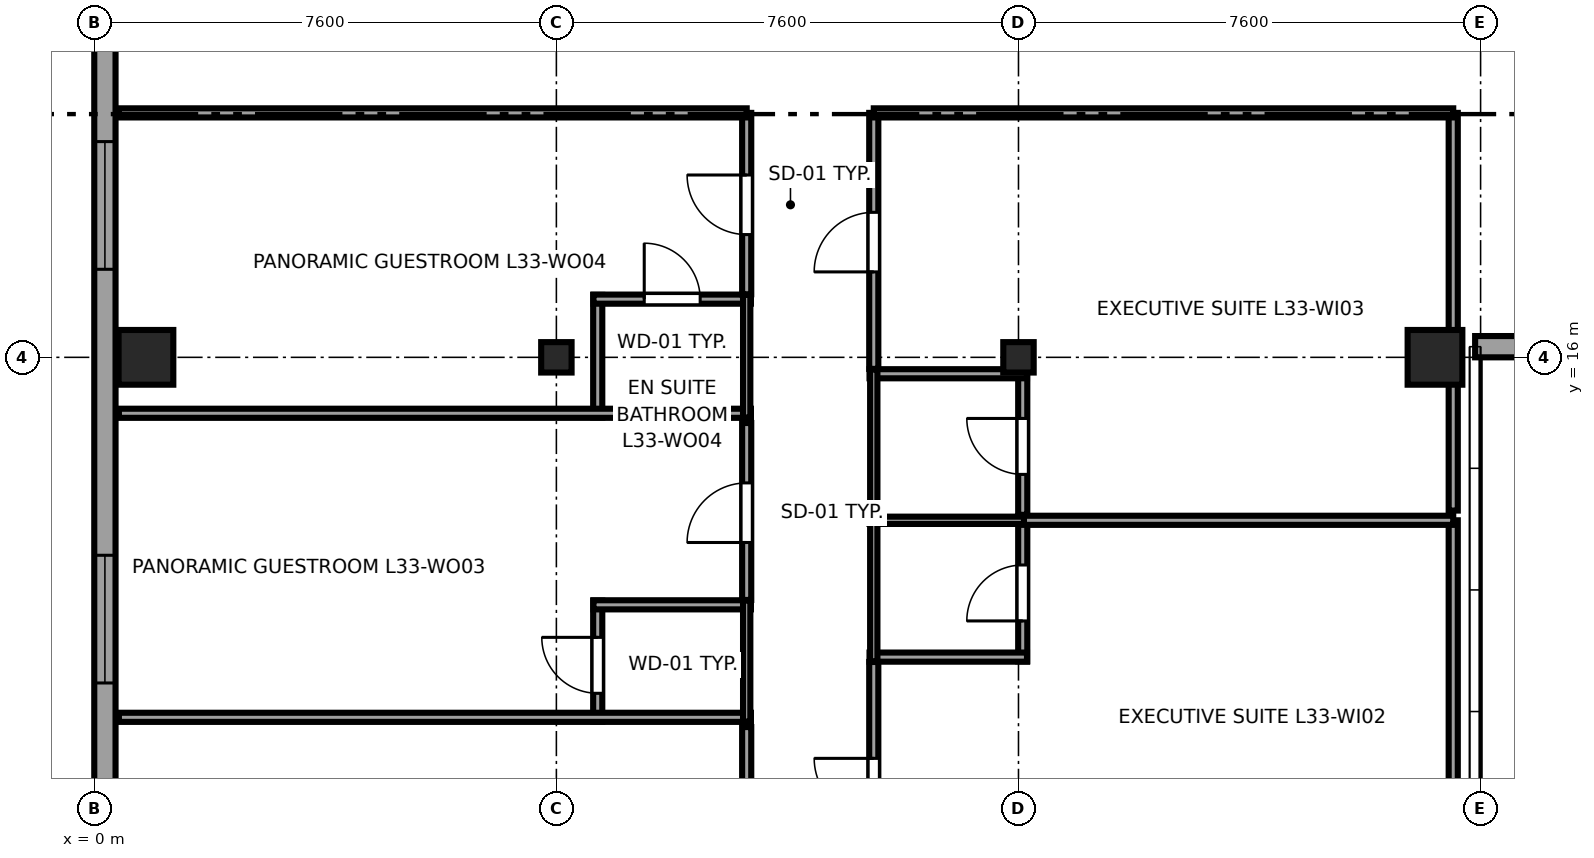
"""IFC4 building model, lengths in metres.
Left out: names, types, materials, properties, quantities, classifications, styles, units other than length and angle.
Written with IfcOpenShell. Run it as: python <this file> out.ifc"""

import sys

from ifc_helpers import new_model, si_unit, direction, frame, frame_2d, origin, origin_2d, place, context, subcontext, project, spatial, rectangle, i_section, extrude, source, transform, mapped, element, fill, save


model = new_model("IFC4")
c1 = context("Model", 3, precision=1e-05, world=origin(), true_north=direction((0.0, 1.0)))
c2 = subcontext(c1, "Body", "Model", "MODEL_VIEW")
j1 = project(units=[si_unit("LENGTHUNIT", "METRE"), si_unit("PLANEANGLEUNIT", "RADIAN")], contexts=[c1])
p1 = place(None, origin())
s1 = spatial("IfcSite", under=j1, at=p1, CompositionType="ELEMENT")
p2 = place(p1, origin())
s2 = spatial("IfcBuilding", under=s1, at=p2, CompositionType="ELEMENT")
p3 = place(p2, frame((0.0, 0.0, 129.3)))
s3 = spatial("IfcBuildingStorey", under=s2, at=p3, CompositionType="ELEMENT", Elevation=129.3)
m1 = source(origin(), c2, "Body", "SweptSolid", [
    extrude(rectangle(XDim=0.9, YDim=0.9, at=origin_2d()), origin(), (0.0, 0.0, 1.0), 3.55),
])
p4 = place(p3, frame((0.85, 16.0, 0.0), z_axis=(0.0, 0.0, 1.0), x_axis=(1.0, 0.0, 0.0)))
e1 = element("IfcColumn", 1, at=p4, inside=s3, PredefinedType="COLUMN", context=c2, shape_type="MappedRepresentation", body=[
    mapped(m1, transform((0.0, 0.0, 0.0), x_axis=(1.0, 0.0, 0.0), y_axis=(0.0, 1.0, 0.0), z_axis=(0.0, 0.0, 1.0), scale=1.0)),
])
m2 = source(origin(), c2, "Body", "SweptSolid", [
    extrude(i_section(OverallWidth=0.5, OverallDepth=0.5, WebThickness=0.022, FlangeThickness=0.034, at=origin_2d()), origin(), (0.0, 0.0, 1.0), 3.55),
])
for number, where, z_axis, x_axis in (
    (2, (7.6, 16.0, 0.0), (0.0, 0.0, 1.0), (1.0, 0.0, 0.0)),
    (3, (15.2, 16.0, 0.0), (0.0, 0.0, 1.0), (1.0, 0.0, 0.0)),
):
    element("IfcColumn", number, at=place(p3, frame(where, z_axis=z_axis, x_axis=x_axis)), inside=s3, PredefinedType="COLUMN", context=c2, shape_type="MappedRepresentation", body=[
        mapped(m2, transform((0.0, 0.0, 0.0), x_axis=(1.0, 0.0, 0.0), y_axis=(0.0, 1.0, 0.0), z_axis=(0.0, 0.0, 1.0), scale=1.0)),
    ])
p5 = place(p3, frame((22.05, 16.0, 0.0), z_axis=(0.0, 0.0, 1.0), x_axis=(1.0, 0.0, 0.0)))
e4 = element("IfcColumn", 4, at=p5, inside=s3, PredefinedType="COLUMN", context=c2, shape_type="MappedRepresentation", body=[
    mapped(m1, transform((0.0, 0.0, 0.0), x_axis=(1.0, 0.0, 0.0), y_axis=(0.0, 1.0, 0.0), z_axis=(0.0, 0.0, 1.0), scale=1.0)),
])
p6 = place(p3, frame((22.71, 16.175, 0.0), z_axis=(0.0, 0.0, 1.0), x_axis=(1.0, 0.0, 0.0)))
e5 = element("IfcWall", 5, at=p6, inside=s3, PredefinedType="SOLIDWALL", context=c2, shape_type="SweptSolid", body=[
    extrude(rectangle(XDim=11.58, YDim=0.35, at=frame_2d((5.79, 0.0))), origin(), (0.0, 0.0, 1.0), 2.748),
])
p7 = place(p6, frame((2.145, 0.0, 0.68)))
e6 = element("IfcOpeningElement", 6, at=p7, cuts=e5, PredefinedType="OPENING", context=c2, shape_type="SweptSolid", body=[
    extrude(rectangle(XDim=2.1, YDim=1.9, at=frame_2d((1.05, 0.95))), frame((0.0, 0.185, 0.0), z_axis=(0.0, -1.0, 0.0), x_axis=(1.0, 0.0, 0.0)), (0.0, 0.0, 1.0), 0.37),
])
p8 = place(p6, frame((7.335, 0.0, 0.68)))
e7 = element("IfcOpeningElement", 7, at=p8, cuts=e5, PredefinedType="OPENING", context=c2, shape_type="SweptSolid", body=[
    extrude(rectangle(XDim=2.1, YDim=1.9, at=frame_2d((1.05, 0.95))), frame((0.0, 0.185, 0.0), z_axis=(0.0, -1.0, 0.0), x_axis=(1.0, 0.0, 0.0)), (0.0, 0.0, 1.0), 0.37),
])
p9 = place(p3, frame((0.175, 41.383, 0.0), z_axis=(0.0, 0.0, 1.0), x_axis=(0.0, -1.0, 0.0)))
e8 = element("IfcWall", 8, at=p9, inside=s3, PredefinedType="SOLIDWALL", context=c2, shape_type="SweptSolid", body=[
    extrude(rectangle(XDim=36.766, YDim=0.35, at=frame_2d((18.383, 0.0))), origin(), (0.0, 0.0, 1.0), 3.37),
])
p10 = place(p9, frame((9.429, 0.0, 0.68)))
e9 = element("IfcOpeningElement", 9, at=p10, cuts=e8, PredefinedType="OPENING", context=c2, shape_type="SweptSolid", body=[
    extrude(rectangle(XDim=2.1, YDim=1.9, at=frame_2d((1.05, 0.95))), frame((0.0, 0.185, 0.0), z_axis=(0.0, -1.0, 0.0), x_axis=(1.0, 0.0, 0.0)), (0.0, 0.0, 1.0), 0.37),
])
p11 = place(p9, frame((13.381, 0.0, 0.68)))
e10 = element("IfcOpeningElement", 10, at=p11, cuts=e8, PredefinedType="OPENING", context=c2, shape_type="SweptSolid", body=[
    extrude(rectangle(XDim=2.1, YDim=1.9, at=frame_2d((1.05, 0.95))), frame((0.0, 0.185, 0.0), z_axis=(0.0, -1.0, 0.0), x_axis=(1.0, 0.0, 0.0)), (0.0, 0.0, 1.0), 0.37),
])
p12 = place(p9, frame((21.835, 0.0, 0.68)))
e11 = element("IfcOpeningElement", 11, at=p12, cuts=e8, PredefinedType="OPENING", context=c2, shape_type="SweptSolid", body=[
    extrude(rectangle(XDim=2.1, YDim=1.9, at=frame_2d((1.05, 0.95))), frame((0.0, 0.185, 0.0), z_axis=(0.0, -1.0, 0.0), x_axis=(1.0, 0.0, 0.0)), (0.0, 0.0, 1.0), 0.37),
])
p13 = place(p9, frame((28.638, 0.0, 0.68)))
e12 = element("IfcOpeningElement", 12, at=p13, cuts=e8, PredefinedType="OPENING", context=c2, shape_type="SweptSolid", body=[
    extrude(rectangle(XDim=2.1, YDim=1.9, at=frame_2d((1.05, 0.95))), frame((0.0, 0.185, 0.0), z_axis=(0.0, -1.0, 0.0), x_axis=(1.0, 0.0, 0.0)), (0.0, 0.0, 1.0), 0.37),
])
p14 = place(p9, frame((33.183, 0.0, 0.62)))
e13 = element("IfcOpeningElement", 13, at=p14, cuts=e8, PredefinedType="OPENING", context=c2, shape_type="SweptSolid", body=[
    extrude(rectangle(XDim=1.5, YDim=1.55, at=frame_2d((0.75, 0.775))), frame((0.0, 0.185, 0.0), z_axis=(0.0, -1.0, 0.0), x_axis=(1.0, 0.0, 0.0)), (0.0, 0.0, 1.0), 0.37),
])
p15 = place(p9, frame((0.861, 0.0, 0.62)))
e14 = element("IfcOpeningElement", 14, at=p15, cuts=e8, PredefinedType="OPENING", context=c2, shape_type="SweptSolid", body=[
    extrude(rectangle(XDim=1.5, YDim=1.55, at=frame_2d((0.75, 0.775))), frame((0.0, 0.185, 0.0), z_axis=(0.0, -1.0, 0.0), x_axis=(1.0, 0.0, 0.0)), (0.0, 0.0, 1.0), 0.37),
])
p16 = place(p3, frame((8.28, 10.01, 0.0), z_axis=(0.0, 0.0, 1.0), x_axis=(0.0, 1.0, 0.0)))
e15 = element("IfcWall", 15, at=p16, inside=s3, PredefinedType="PARTITIONING", context=c2, shape_type="SweptSolid", body=[
    extrude(rectangle(XDim=1.99, YDim=0.15, at=frame_2d((0.995, 0.0))), origin(), (0.0, 0.0, 1.0), 3.37),
])
p17 = place(p16, frame((0.465, 0.0, 0.0)))
e16 = element("IfcOpeningElement", 16, at=p17, cuts=e15, PredefinedType="OPENING", context=c2, shape_type="SweptSolid", body=[
    extrude(rectangle(XDim=0.92, YDim=2.01, at=frame_2d((0.46, 1.005))), frame((0.0, 0.085, 0.0), z_axis=(0.0, -1.0, 0.0), x_axis=(1.0, 0.0, 0.0)), (0.0, 0.0, 1.0), 0.17),
])
p18 = place(p3, frame((0.405, 10.08, 0.0), z_axis=(0.0, 0.0, 1.0), x_axis=(1.0, 0.0, 0.0)))
e17 = element("IfcWall", 17, at=p18, inside=s3, PredefinedType="PARTITIONING", context=c2, shape_type="SweptSolid", body=[
    extrude(rectangle(XDim=10.395, YDim=0.15, at=frame_2d((5.198, 0.0))), origin(), (0.0, 0.0, 1.0), 3.37),
])
p19 = place(p3, frame((8.21, 11.93, 0.0), z_axis=(0.0, 0.0, 1.0), x_axis=(1.0, 0.0, 0.0)))
e18 = element("IfcWall", 18, at=p19, inside=s3, PredefinedType="PARTITIONING", context=c2, shape_type="SweptSolid", body=[
    extrude(rectangle(XDim=2.59, YDim=0.15, at=frame_2d((1.295, 0.0))), origin(), (0.0, 0.0, 1.0), 3.37),
])
p20 = place(p3, frame((10.73, 10.01, 0.0), z_axis=(0.0, 0.0, 1.0), x_axis=(0.0, 1.0, 0.0)))
e19 = element("IfcWall", 19, at=p20, inside=s3, PredefinedType="PLUMBINGWALL", context=c2, shape_type="SweptSolid", body=[
    extrude(rectangle(XDim=1.99, YDim=0.12, at=frame_2d((0.995, 0.0))), origin(), (0.0, 0.0, 1.0), 3.37),
])
p21 = place(p3, frame((8.28, 15.01, 0.0), z_axis=(0.0, 0.0, 1.0), x_axis=(0.0, 1.0, 0.0)))
e20 = element("IfcWall", 20, at=p21, inside=s3, PredefinedType="PARTITIONING", context=c2, shape_type="SweptSolid", body=[
    extrude(rectangle(XDim=2.017, YDim=0.15, at=frame_2d((1.009, 0.0))), origin(), (0.0, 0.0, 1.0), 3.37),
])
p22 = place(p3, frame((0.405, 15.08, 0.0), z_axis=(0.0, 0.0, 1.0), x_axis=(1.0, 0.0, 0.0)))
e21 = element("IfcWall", 21, at=p22, inside=s3, PredefinedType="PARTITIONING", context=c2, shape_type="SweptSolid", body=[
    extrude(rectangle(XDim=10.395, YDim=0.15, at=frame_2d((5.198, 0.0))), origin(), (0.0, 0.0, 1.0), 3.37),
])
p23 = place(p3, frame((8.21, 16.957, 0.0), z_axis=(0.0, 0.0, 1.0), x_axis=(1.0, 0.0, 0.0)))
e22 = element("IfcWall", 22, at=p23, inside=s3, PredefinedType="PARTITIONING", context=c2, shape_type="SweptSolid", body=[
    extrude(rectangle(XDim=2.59, YDim=0.15, at=frame_2d((1.295, 0.0))), origin(), (0.0, 0.0, 1.0), 3.37),
])
p24 = place(p23, frame((0.835, 0.0, 0.0)))
e23 = element("IfcOpeningElement", 23, at=p24, cuts=e22, PredefinedType="OPENING", context=c2, shape_type="SweptSolid", body=[
    extrude(rectangle(XDim=0.92, YDim=2.01, at=frame_2d((0.46, 1.005))), frame((0.0, 0.085, 0.0), z_axis=(0.0, -1.0, 0.0), x_axis=(1.0, 0.0, 0.0)), (0.0, 0.0, 1.0), 0.17),
])
p25 = place(p3, frame((10.73, 15.01, 0.0), z_axis=(0.0, 0.0, 1.0), x_axis=(0.0, 1.0, 0.0)))
e24 = element("IfcWall", 24, at=p25, inside=s3, PredefinedType="PLUMBINGWALL", context=c2, shape_type="SweptSolid", body=[
    extrude(rectangle(XDim=2.017, YDim=0.12, at=frame_2d((1.009, 0.0))), origin(), (0.0, 0.0, 1.0), 3.37),
])
p26 = place(p3, frame((15.27, 11.0, 0.0), z_axis=(0.0, 0.0, 1.0), x_axis=(0.0, 1.0, 0.0)))
e25 = element("IfcWall", 25, at=p26, inside=s3, PredefinedType="PARTITIONING", context=c2, shape_type="SweptSolid", body=[
    extrude(rectangle(XDim=2.39, YDim=0.15, at=frame_2d((1.195, 0.0))), origin(), (0.0, 0.0, 1.0), 2.827),
])
p27 = place(p26, frame((0.665, 0.0, 0.0)))
e26 = element("IfcOpeningElement", 26, at=p27, cuts=e25, PredefinedType="OPENING", context=c2, shape_type="SweptSolid", body=[
    extrude(rectangle(XDim=0.92, YDim=2.01, at=frame_2d((0.46, 1.005))), frame((0.0, 0.085, 0.0), z_axis=(0.0, -1.0, 0.0), x_axis=(1.0, 0.0, 0.0)), (0.0, 0.0, 1.0), 0.17),
])
p28 = place(p3, frame((12.75, 11.07, 0.0), z_axis=(0.0, 0.0, 1.0), x_axis=(1.0, 0.0, 0.0)))
e27 = element("IfcWall", 27, at=p28, inside=s3, PredefinedType="PARTITIONING", context=c2, shape_type="SweptSolid", body=[
    extrude(rectangle(XDim=2.59, YDim=0.15, at=frame_2d((1.295, 0.0))), origin(), (0.0, 0.0, 1.0), 3.37),
])
p29 = place(p3, frame((12.75, 13.32, 0.0), z_axis=(0.0, 0.0, 1.0), x_axis=(1.0, 0.0, 0.0)))
e28 = element("IfcWall", 28, at=p29, inside=s3, PredefinedType="PLUMBINGWALL", context=c2, shape_type="SweptSolid", body=[
    extrude(rectangle(XDim=2.59, YDim=0.12, at=frame_2d((1.295, 0.0))), origin(), (0.0, 0.0, 1.0), 3.37),
])
p30 = place(p3, frame((12.82, 11.0, 0.0), z_axis=(0.0, 0.0, 1.0), x_axis=(0.0, 1.0, 0.0)))
e29 = element("IfcWall", 29, at=p30, inside=s3, PredefinedType="PLUMBINGWALL", context=c2, shape_type="SweptSolid", body=[
    extrude(rectangle(XDim=2.39, YDim=0.12, at=frame_2d((1.195, 0.0))), origin(), (0.0, 0.0, 1.0), 3.37),
])
p31 = place(p3, frame((15.27, 13.41, 0.0), z_axis=(0.0, 0.0, 1.0), x_axis=(0.0, 1.0, 0.0)))
e30 = element("IfcWall", 30, at=p31, inside=s3, PredefinedType="PARTITIONING", context=c2, shape_type="SweptSolid", body=[
    extrude(rectangle(XDim=2.39, YDim=0.15, at=frame_2d((1.195, 0.0))), origin(), (0.0, 0.0, 1.0), 2.827),
])
p32 = place(p31, frame((0.665, 0.0, 0.0)))
e31 = element("IfcOpeningElement", 31, at=p32, cuts=e30, PredefinedType="OPENING", context=c2, shape_type="SweptSolid", body=[
    extrude(rectangle(XDim=0.92, YDim=2.01, at=frame_2d((0.46, 1.005))), frame((0.0, 0.085, 0.0), z_axis=(0.0, -1.0, 0.0), x_axis=(1.0, 0.0, 0.0)), (0.0, 0.0, 1.0), 0.17),
])
p33 = place(p3, frame((12.75, 15.73, 0.0), z_axis=(0.0, 0.0, 1.0), x_axis=(1.0, 0.0, 0.0)))
e32 = element("IfcWall", 32, at=p33, inside=s3, PredefinedType="PARTITIONING", context=c2, shape_type="SweptSolid", body=[
    extrude(rectangle(XDim=2.59, YDim=0.15, at=frame_2d((1.295, 0.0))), origin(), (0.0, 0.0, 1.0), 3.37),
])
p34 = place(p3, frame((12.82, 13.41, 0.0), z_axis=(0.0, 0.0, 1.0), x_axis=(0.0, 1.0, 0.0)))
e33 = element("IfcWall", 33, at=p34, inside=s3, PredefinedType="PLUMBINGWALL", context=c2, shape_type="SweptSolid", body=[
    extrude(rectangle(XDim=2.39, YDim=0.12, at=frame_2d((1.195, 0.0))), origin(), (0.0, 0.0, 1.0), 3.37),
])
p35 = place(p3, frame((10.73, 6.937, 0.0), z_axis=(0.0, 0.0, 1.0), x_axis=(0.0, 1.0, 0.0)))
e34 = element("IfcWall", 34, at=p35, inside=s3, PredefinedType="PARTITIONING", context=c2, shape_type="SweptSolid", body=[
    extrude(rectangle(XDim=2.983, YDim=0.15, at=frame_2d((1.491, 0.0))), origin(), (0.0, 0.0, 1.0), 3.37),
])
p36 = place(p35, frame((0.981, 0.0, 0.0)))
e35 = element("IfcOpeningElement", 35, at=p36, cuts=e34, PredefinedType="OPENING", context=c2, shape_type="SweptSolid", body=[
    extrude(rectangle(XDim=0.98, YDim=2.12, at=frame_2d((0.49, 1.06))), frame((0.0, 0.085, 0.0), z_axis=(0.0, -1.0, 0.0), x_axis=(1.0, 0.0, 0.0)), (0.0, 0.0, 1.0), 0.17),
])
p37 = place(p3, frame((10.73, 12.01, 0.0), z_axis=(0.0, 0.0, 1.0), x_axis=(0.0, 1.0, 0.0)))
e36 = element("IfcWall", 36, at=p37, inside=s3, PredefinedType="PARTITIONING", context=c2, shape_type="SweptSolid", body=[
    extrude(rectangle(XDim=2.91, YDim=0.15, at=frame_2d((1.455, 0.0))), origin(), (0.0, 0.0, 1.0), 3.37),
])
p38 = place(p37, frame((0.945, 0.0, 0.0)))
e37 = element("IfcOpeningElement", 37, at=p38, cuts=e36, PredefinedType="OPENING", context=c2, shape_type="SweptSolid", body=[
    extrude(rectangle(XDim=0.98, YDim=2.12, at=frame_2d((0.49, 1.06))), frame((0.0, 0.085, 0.0), z_axis=(0.0, -1.0, 0.0), x_axis=(1.0, 0.0, 0.0)), (0.0, 0.0, 1.0), 0.17),
])
p39 = place(p3, frame((10.73, 17.037, 0.0), z_axis=(0.0, 0.0, 1.0), x_axis=(0.0, 1.0, 0.0)))
e38 = element("IfcWall", 38, at=p39, inside=s3, PredefinedType="PARTITIONING", context=c2, shape_type="SweptSolid", body=[
    extrude(rectangle(XDim=2.983, YDim=0.15, at=frame_2d((1.491, 0.0))), origin(), (0.0, 0.0, 1.0), 3.37),
])
p40 = place(p39, frame((0.981, 0.0, 0.0)))
e39 = element("IfcOpeningElement", 39, at=p40, cuts=e38, PredefinedType="OPENING", context=c2, shape_type="SweptSolid", body=[
    extrude(rectangle(XDim=0.98, YDim=2.12, at=frame_2d((0.49, 1.06))), frame((0.0, 0.085, 0.0), z_axis=(0.0, -1.0, 0.0), x_axis=(1.0, 0.0, 0.0)), (0.0, 0.0, 1.0), 0.17),
])
p41 = place(p3, frame((0.405, 20.02, 0.0), z_axis=(0.0, 0.0, 1.0), x_axis=(1.0, 0.0, 0.0)))
e40 = element("IfcWall", 40, at=p41, inside=s3, PredefinedType="PARTITIONING", context=c2, shape_type="SweptSolid", body=[
    extrude(rectangle(XDim=10.325, YDim=0.15, at=frame_2d((5.163, 0.0))), origin(), (0.0, 0.0, 1.0), 3.37),
])
p42 = place(p3, frame((12.82, 6.88, 0.0), z_axis=(0.0, 0.0, 1.0), x_axis=(0.0, 1.0, 0.0)))
e41 = element("IfcWall", 41, at=p42, inside=s3, PredefinedType="PARTITIONING", context=c2, shape_type="SweptSolid", body=[
    extrude(rectangle(XDim=4.11, YDim=0.15, at=frame_2d((2.055, 0.0))), origin(), (0.0, 0.0, 1.0), 3.37),
])
p43 = place(p42, frame((1.545, 0.0, 0.0)))
e42 = element("IfcOpeningElement", 42, at=p43, cuts=e41, PredefinedType="OPENING", context=c2, shape_type="SweptSolid", body=[
    extrude(rectangle(XDim=0.98, YDim=2.12, at=frame_2d((0.49, 1.06))), frame((0.0, 0.085, 0.0), z_axis=(0.0, -1.0, 0.0), x_axis=(1.0, 0.0, 0.0)), (0.0, 0.0, 1.0), 0.17),
])
p44 = place(p3, frame((22.35, 6.88, 0.0), z_axis=(0.0, 0.0, 1.0), x_axis=(0.0, 1.0, 0.0)))
e43 = element("IfcWall", 43, at=p44, inside=s3, PredefinedType="PARTITIONING", context=c2, shape_type="SweptSolid", body=[
    extrude(rectangle(XDim=6.44, YDim=0.15, at=frame_2d((3.22, 0.0))), origin(), (0.0, 0.0, 1.0), 3.37),
])
p45 = place(p3, frame((15.29, 13.32, 0.0), z_axis=(0.0, 0.0, 1.0), x_axis=(1.0, 0.0, 0.0)))
e44 = element("IfcWall", 44, at=p45, inside=s3, PredefinedType="PARTITIONING", context=c2, shape_type="SweptSolid", body=[
    extrude(rectangle(XDim=7.06, YDim=0.15, at=frame_2d((3.53, 0.0))), origin(), (0.0, 0.0, 1.0), 3.37),
])
p46 = place(p3, frame((12.82, 15.81, 0.0), z_axis=(0.0, 0.0, 1.0), x_axis=(0.0, 1.0, 0.0)))
e45 = element("IfcWall", 45, at=p46, inside=s3, PredefinedType="PARTITIONING", context=c2, shape_type="SweptSolid", body=[
    extrude(rectangle(XDim=4.21, YDim=0.15, at=frame_2d((2.105, 0.0))), origin(), (0.0, 0.0, 1.0), 3.37),
])
p47 = place(p46, frame((1.595, 0.0, 0.0)))
e46 = element("IfcOpeningElement", 46, at=p47, cuts=e45, PredefinedType="OPENING", context=c2, shape_type="SweptSolid", body=[
    extrude(rectangle(XDim=0.98, YDim=2.12, at=frame_2d((0.49, 1.06))), frame((0.0, 0.085, 0.0), z_axis=(0.0, -1.0, 0.0), x_axis=(1.0, 0.0, 0.0)), (0.0, 0.0, 1.0), 0.17),
])
p48 = place(p3, frame((22.35, 13.48, 0.0), z_axis=(0.0, 0.0, 1.0), x_axis=(0.0, 1.0, 0.0)))
e47 = element("IfcWall", 47, at=p48, inside=s3, PredefinedType="PARTITIONING", context=c2, shape_type="SweptSolid", body=[
    extrude(rectangle(XDim=6.54, YDim=0.15, at=frame_2d((3.27, 0.0))), origin(), (0.0, 0.0, 1.0), 3.37),
])
p49 = place(p3, frame((12.82, 20.02, 0.0), z_axis=(0.0, 0.0, 1.0), x_axis=(1.0, 0.0, 0.0)))
e48 = element("IfcWall", 48, at=p49, inside=s3, PredefinedType="PARTITIONING", context=c2, shape_type="SweptSolid", body=[
    extrude(rectangle(XDim=9.53, YDim=0.15, at=frame_2d((4.765, 0.0))), origin(), (0.0, 0.0, 1.0), 2.954),
])
m3 = source(origin(), c2, "Body", "SweptSolid", [
    extrude(rectangle(XDim=2.1, YDim=1.9, at=frame_2d((1.05, 0.95))), frame((0.0, 0.09, 0.0), z_axis=(0.0, -1.0, 0.0), x_axis=(1.0, 0.0, 0.0)), (0.0, 0.0, 1.0), 0.06),
])
p50 = place(p12, origin())
e49 = element("IfcWindow", 49, at=p50, inside=s3, PartitioningType="TRIPLE_PANEL_HORIZONTAL", PredefinedType="WINDOW", context=c2, shape_type="MappedRepresentation", body=[
    mapped(m3, transform((0.0, 0.0, 0.0), x_axis=(1.0, 0.0, 0.0), y_axis=(0.0, 1.0, 0.0), z_axis=(0.0, 0.0, 1.0), scale=1.0)),
])
fill(e11, e49)
p51 = place(p13, origin())
e50 = element("IfcWindow", 50, at=p51, inside=s3, PartitioningType="TRIPLE_PANEL_HORIZONTAL", PredefinedType="WINDOW", context=c2, shape_type="MappedRepresentation", body=[
    mapped(m3, transform((0.0, 0.0, 0.0), x_axis=(1.0, 0.0, 0.0), y_axis=(0.0, 1.0, 0.0), z_axis=(0.0, 0.0, 1.0), scale=1.0)),
])
fill(e12, e50)
m4 = source(origin(), c2, "Body", "SweptSolid", [
    extrude(rectangle(XDim=0.92, YDim=2.01, at=frame_2d((0.46, 1.005))), frame((0.0, 0.025, 0.0), z_axis=(0.0, -1.0, 0.0), x_axis=(1.0, 0.0, 0.0)), (0.0, 0.0, 1.0), 0.05),
])
p52 = place(p17, origin())
e51 = element("IfcDoor", 51, at=p52, inside=s3, OperationType="SINGLE_SWING_RIGHT", PredefinedType="DOOR", context=c2, shape_type="MappedRepresentation", body=[
    mapped(m4, transform((0.0, 0.0, 0.0), x_axis=(1.0, 0.0, 0.0), y_axis=(0.0, 1.0, 0.0), z_axis=(0.0, 0.0, 1.0), scale=1.0)),
])
fill(e16, e51)
p53 = place(p24, origin())
e52 = element("IfcDoor", 52, at=p53, inside=s3, OperationType="SINGLE_SWING_LEFT", PredefinedType="DOOR", context=c2, shape_type="MappedRepresentation", body=[
    mapped(m4, transform((0.0, 0.0, 0.0), x_axis=(1.0, 0.0, 0.0), y_axis=(0.0, 1.0, 0.0), z_axis=(0.0, 0.0, 1.0), scale=1.0)),
])
fill(e23, e52)
p54 = place(p27, origin())
e53 = element("IfcDoor", 53, at=p54, inside=s3, OperationType="SINGLE_SWING_LEFT", PredefinedType="DOOR", context=c2, shape_type="MappedRepresentation", body=[
    mapped(m4, transform((0.0, 0.0, 0.0), x_axis=(1.0, 0.0, 0.0), y_axis=(0.0, 1.0, 0.0), z_axis=(0.0, 0.0, 1.0), scale=1.0)),
])
fill(e26, e53)
p55 = place(p32, origin())
e54 = element("IfcDoor", 54, at=p55, inside=s3, OperationType="SINGLE_SWING_RIGHT", PredefinedType="DOOR", context=c2, shape_type="MappedRepresentation", body=[
    mapped(m4, transform((0.0, 0.0, 0.0), x_axis=(1.0, 0.0, 0.0), y_axis=(0.0, 1.0, 0.0), z_axis=(0.0, 0.0, 1.0), scale=1.0)),
])
fill(e31, e54)
m5 = source(origin(), c2, "Body", "SweptSolid", [
    extrude(rectangle(XDim=0.98, YDim=2.12, at=frame_2d((0.49, 1.06))), frame((0.0, 0.025, 0.0), z_axis=(0.0, -1.0, 0.0), x_axis=(1.0, 0.0, 0.0)), (0.0, 0.0, 1.0), 0.05),
])
p56 = place(p38, origin())
e55 = element("IfcDoor", 55, at=p56, inside=s3, OperationType="SINGLE_SWING_LEFT", PredefinedType="DOOR", context=c2, shape_type="MappedRepresentation", body=[
    mapped(m5, transform((0.0, 0.0, 0.0), x_axis=(1.0, 0.0, 0.0), y_axis=(0.0, 1.0, 0.0), z_axis=(0.0, 0.0, 1.0), scale=1.0)),
])
fill(e37, e55)
p57 = place(p40, origin())
e56 = element("IfcDoor", 56, at=p57, inside=s3, OperationType="SINGLE_SWING_RIGHT", PredefinedType="DOOR", context=c2, shape_type="MappedRepresentation", body=[
    mapped(m5, transform((0.0, 0.0, 0.0), x_axis=(1.0, 0.0, 0.0), y_axis=(0.0, 1.0, 0.0), z_axis=(0.0, 0.0, 1.0), scale=1.0)),
])
fill(e39, e56)
p58 = place(p43, origin())
e57 = element("IfcDoor", 57, at=p58, inside=s3, OperationType="SINGLE_SWING_RIGHT", PredefinedType="DOOR", context=c2, shape_type="MappedRepresentation", body=[
    mapped(m5, transform((0.0, 0.0, 0.0), x_axis=(1.0, 0.0, 0.0), y_axis=(0.0, 1.0, 0.0), z_axis=(0.0, 0.0, 1.0), scale=1.0)),
])
fill(e42, e57)
p59 = place(p47, origin())
e58 = element("IfcDoor", 58, at=p59, inside=s3, OperationType="SINGLE_SWING_LEFT", PredefinedType="DOOR", context=c2, shape_type="MappedRepresentation", body=[
    mapped(m5, transform((0.0, 0.0, 0.0), x_axis=(1.0, 0.0, 0.0), y_axis=(0.0, 1.0, 0.0), z_axis=(0.0, 0.0, 1.0), scale=1.0)),
])
fill(e46, e58)
save(model, sys.argv[1])
